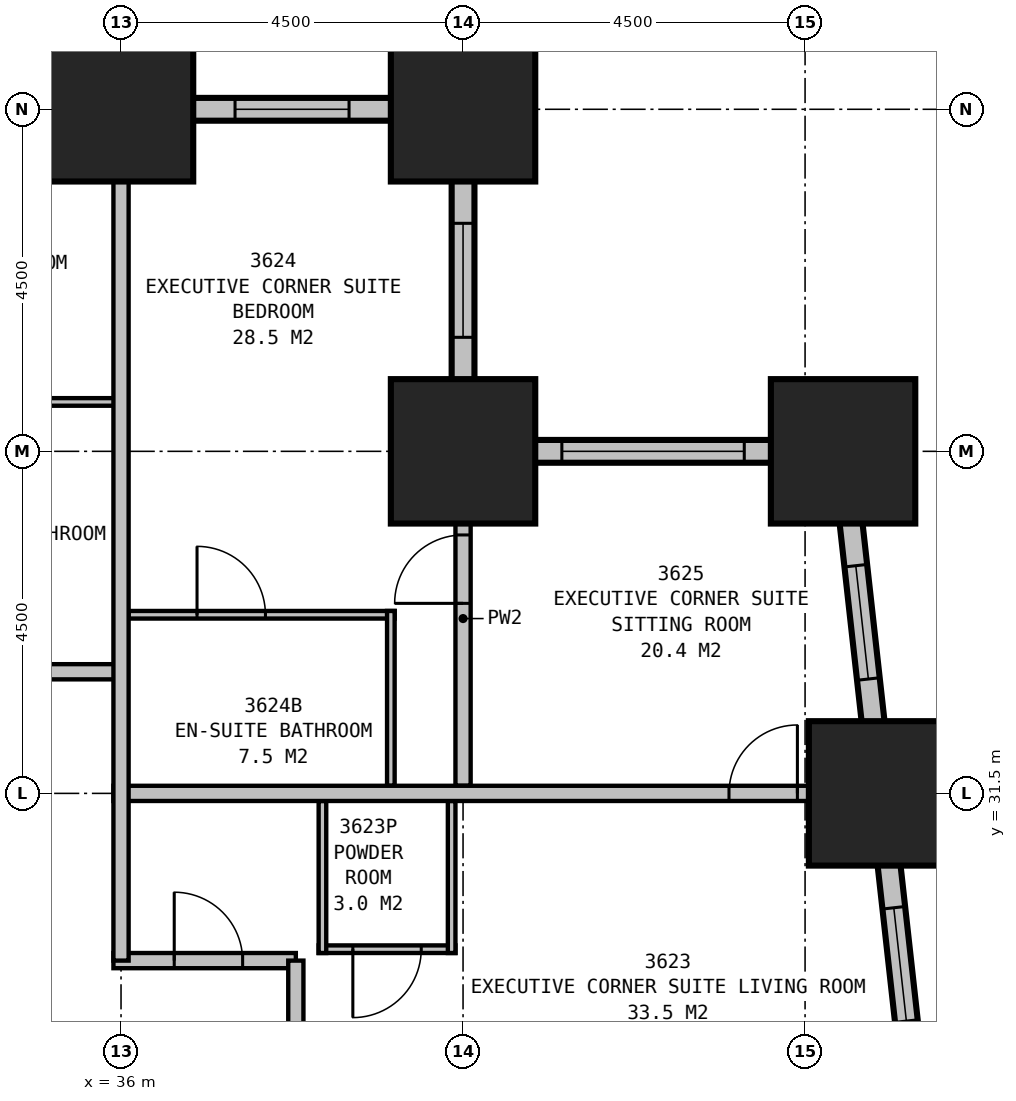
"""IFC4 building model, lengths in metres.
Left out: names, types, materials, properties, quantities, classifications, styles, units other than length and angle.
Written with IfcOpenShell. Run it as: python <this file> out.ifc"""

import sys

from ifc_helpers import new_model, si_unit, direction, frame, frame_2d, origin, origin_2d, place, context, subcontext, project, spatial, rectangle, extrude, element, fill, save


model = new_model("IFC4")
c1 = context("Model", 3, precision=1e-05, world=origin(), true_north=direction((0.0, 1.0)))
c2 = subcontext(c1, "Body", "Model", "MODEL_VIEW")
j1 = project(units=[si_unit("LENGTHUNIT", "METRE"), si_unit("PLANEANGLEUNIT", "RADIAN")], contexts=[c1])
p1 = place(None, origin())
s1 = spatial("IfcSite", under=j1, at=p1, CompositionType="ELEMENT")
p2 = place(p1, origin())
s2 = spatial("IfcBuilding", under=s1, at=p2, CompositionType="ELEMENT")
p3 = place(p2, frame((0.0, 0.0, 138.9)))
s3 = spatial("IfcBuildingStorey", under=s2, at=p3, CompositionType="ELEMENT", Elevation=138.9)
for number, where, z_axis, x_axis in (
    (1, (46.0, 31.5, 0.0), (0.0, 0.0, 1.0), (1.0, 0.0, 0.0)),
    (2, (45.5, 36.0, 0.0), (0.0, 0.0, 1.0), (1.0, 0.0, 0.0)),
    (3, (40.5, 36.0, 0.0), (0.0, 0.0, 1.0), (1.0, 0.0, 0.0)),
    (4, (40.5, 40.5, 0.0), (0.0, 0.0, 1.0), (1.0, 0.0, 0.0)),
    (5, (36.0, 40.5, 0.0), (0.0, 0.0, 1.0), (1.0, 0.0, 0.0)),
):
    element("IfcColumn", number, at=place(p3, frame(where, z_axis=z_axis, x_axis=x_axis)), inside=s3, PredefinedType="COLUMN", context=c2, shape_type="SweptSolid", body=[
        extrude(rectangle(XDim=1.9, YDim=1.9, at=origin_2d()), origin(), (0.0, 0.0, 1.0), 3.5),
    ])
p4 = place(p3, frame((49.017, 4.351, 0.0), z_axis=(0.0, 0.0, 1.0), x_axis=(-0.110433201132, 0.993883548555, 0.0)))
e6 = element("IfcWall", 6, at=p4, inside=s3, PredefinedType="STANDARD", context=c2, shape_type="SweptSolid", body=[
    extrude(rectangle(XDim=31.994, YDim=0.3, at=frame_2d((15.997, 0.0))), origin(), (0.0, 0.0, 1.0), 2.15),
])
p5 = place(p4, frame((1.664, 0.0, 0.5)))
e7 = element("IfcOpeningElement", 7, at=p5, cuts=e6, PredefinedType="OPENING", context=c2, shape_type="SweptSolid", body=[
    extrude(rectangle(XDim=1.5, YDim=1.5, at=frame_2d((0.75, 0.75))), frame((0.0, 0.16, 0.0), z_axis=(0.0, -1.0, 0.0), x_axis=(1.0, 0.0, 0.0)), (0.0, 0.0, 1.0), 0.32),
])
p6 = place(p4, frame((6.192, 0.0, 0.5)))
e8 = element("IfcOpeningElement", 8, at=p6, cuts=e6, PredefinedType="OPENING", context=c2, shape_type="SweptSolid", body=[
    extrude(rectangle(XDim=1.5, YDim=1.5, at=frame_2d((0.75, 0.75))), frame((0.0, 0.16, 0.0), z_axis=(0.0, -1.0, 0.0), x_axis=(1.0, 0.0, 0.0)), (0.0, 0.0, 1.0), 0.32),
])
p7 = place(p4, frame((10.719, 0.0, 0.5)))
e9 = element("IfcOpeningElement", 9, at=p7, cuts=e6, PredefinedType="OPENING", context=c2, shape_type="SweptSolid", body=[
    extrude(rectangle(XDim=1.5, YDim=1.5, at=frame_2d((0.75, 0.75))), frame((0.0, 0.16, 0.0), z_axis=(0.0, -1.0, 0.0), x_axis=(1.0, 0.0, 0.0)), (0.0, 0.0, 1.0), 0.32),
])
p8 = place(p4, frame((15.247, 0.0, 0.5)))
e10 = element("IfcOpeningElement", 10, at=p8, cuts=e6, PredefinedType="OPENING", context=c2, shape_type="SweptSolid", body=[
    extrude(rectangle(XDim=1.5, YDim=1.5, at=frame_2d((0.75, 0.75))), frame((0.0, 0.16, 0.0), z_axis=(0.0, -1.0, 0.0), x_axis=(1.0, 0.0, 0.0)), (0.0, 0.0, 1.0), 0.32),
])
p9 = place(p4, frame((19.775, 0.0, 0.5)))
e11 = element("IfcOpeningElement", 11, at=p9, cuts=e6, PredefinedType="OPENING", context=c2, shape_type="SweptSolid", body=[
    extrude(rectangle(XDim=1.5, YDim=1.5, at=frame_2d((0.75, 0.75))), frame((0.0, 0.16, 0.0), z_axis=(0.0, -1.0, 0.0), x_axis=(1.0, 0.0, 0.0)), (0.0, 0.0, 1.0), 0.32),
])
p10 = place(p4, frame((24.302, 0.0, 0.5)))
e12 = element("IfcOpeningElement", 12, at=p10, cuts=e6, PredefinedType="OPENING", context=c2, shape_type="SweptSolid", body=[
    extrude(rectangle(XDim=1.5, YDim=1.5, at=frame_2d((0.75, 0.75))), frame((0.0, 0.16, 0.0), z_axis=(0.0, -1.0, 0.0), x_axis=(1.0, 0.0, 0.0)), (0.0, 0.0, 1.0), 0.32),
])
p11 = place(p4, frame((28.83, 0.0, 0.5)))
e13 = element("IfcOpeningElement", 13, at=p11, cuts=e6, PredefinedType="OPENING", context=c2, shape_type="SweptSolid", body=[
    extrude(rectangle(XDim=1.5, YDim=1.5, at=frame_2d((0.75, 0.75))), frame((0.0, 0.16, 0.0), z_axis=(0.0, -1.0, 0.0), x_axis=(1.0, 0.0, 0.0)), (0.0, 0.0, 1.0), 0.32),
])
p12 = place(p3, frame((45.65, 36.0, 0.0), z_axis=(0.0, 0.0, 1.0), x_axis=(-1.0, 0.0, 0.0)))
e14 = element("IfcWall", 14, at=p12, inside=s3, PredefinedType="STANDARD", context=c2, shape_type="SweptSolid", body=[
    extrude(rectangle(XDim=5.3, YDim=0.3, at=frame_2d((2.65, 0.0))), origin(), (0.0, 0.0, 1.0), 2.15),
])
p13 = place(p12, frame((1.45, 0.0, 0.5)))
e15 = element("IfcOpeningElement", 15, at=p13, cuts=e14, PredefinedType="OPENING", context=c2, shape_type="SweptSolid", body=[
    extrude(rectangle(XDim=2.4, YDim=1.5, at=frame_2d((1.2, 0.75))), frame((0.0, 0.16, 0.0), z_axis=(0.0, -1.0, 0.0), x_axis=(1.0, 0.0, 0.0)), (0.0, 0.0, 1.0), 0.32),
])
p14 = place(p3, frame((40.5, 35.85, 0.0), z_axis=(0.0, 0.0, 1.0), x_axis=(0.0, 1.0, 0.0)))
e16 = element("IfcWall", 16, at=p14, inside=s3, PredefinedType="STANDARD", context=c2, shape_type="SweptSolid", body=[
    extrude(rectangle(XDim=4.8, YDim=0.3, at=frame_2d((2.4, 0.0))), origin(), (0.0, 0.0, 1.0), 2.15),
])
p15 = place(p14, frame((1.65, 0.0, 0.5)))
e17 = element("IfcOpeningElement", 17, at=p15, cuts=e16, PredefinedType="OPENING", context=c2, shape_type="SweptSolid", body=[
    extrude(rectangle(XDim=1.5, YDim=1.5, at=frame_2d((0.75, 0.75))), frame((0.0, 0.16, 0.0), z_axis=(0.0, -1.0, 0.0), x_axis=(1.0, 0.0, 0.0)), (0.0, 0.0, 1.0), 0.32),
])
p16 = place(p3, frame((40.65, 40.5, 0.0), z_axis=(0.0, 0.0, 1.0), x_axis=(-1.0, 0.0, 0.0)))
e18 = element("IfcWall", 18, at=p16, inside=s3, PredefinedType="STANDARD", context=c2, shape_type="SweptSolid", body=[
    extrude(rectangle(XDim=31.8, YDim=0.3, at=frame_2d((15.9, 0.0))), origin(), (0.0, 0.0, 1.0), 2.15),
])
p17 = place(p16, frame((1.65, 0.0, 0.5)))
e19 = element("IfcOpeningElement", 19, at=p17, cuts=e18, PredefinedType="OPENING", context=c2, shape_type="SweptSolid", body=[
    extrude(rectangle(XDim=1.5, YDim=1.5, at=frame_2d((0.75, 0.75))), frame((0.0, 0.16, 0.0), z_axis=(0.0, -1.0, 0.0), x_axis=(1.0, 0.0, 0.0)), (0.0, 0.0, 1.0), 0.32),
])
p18 = place(p16, frame((6.15, 0.0, 0.5)))
e20 = element("IfcOpeningElement", 20, at=p18, cuts=e18, PredefinedType="OPENING", context=c2, shape_type="SweptSolid", body=[
    extrude(rectangle(XDim=1.5, YDim=1.5, at=frame_2d((0.75, 0.75))), frame((0.0, 0.16, 0.0), z_axis=(0.0, -1.0, 0.0), x_axis=(1.0, 0.0, 0.0)), (0.0, 0.0, 1.0), 0.32),
])
p19 = place(p16, frame((10.65, 0.0, 0.5)))
e21 = element("IfcOpeningElement", 21, at=p19, cuts=e18, PredefinedType="OPENING", context=c2, shape_type="SweptSolid", body=[
    extrude(rectangle(XDim=1.5, YDim=1.5, at=frame_2d((0.75, 0.75))), frame((0.0, 0.16, 0.0), z_axis=(0.0, -1.0, 0.0), x_axis=(1.0, 0.0, 0.0)), (0.0, 0.0, 1.0), 0.32),
])
p20 = place(p16, frame((15.15, 0.0, 0.5)))
e22 = element("IfcOpeningElement", 22, at=p20, cuts=e18, PredefinedType="OPENING", context=c2, shape_type="SweptSolid", body=[
    extrude(rectangle(XDim=1.5, YDim=1.5, at=frame_2d((0.75, 0.75))), frame((0.0, 0.16, 0.0), z_axis=(0.0, -1.0, 0.0), x_axis=(1.0, 0.0, 0.0)), (0.0, 0.0, 1.0), 0.32),
])
p21 = place(p16, frame((19.65, 0.0, 0.5)))
e23 = element("IfcOpeningElement", 23, at=p21, cuts=e18, PredefinedType="OPENING", context=c2, shape_type="SweptSolid", body=[
    extrude(rectangle(XDim=1.5, YDim=1.5, at=frame_2d((0.75, 0.75))), frame((0.0, 0.16, 0.0), z_axis=(0.0, -1.0, 0.0), x_axis=(1.0, 0.0, 0.0)), (0.0, 0.0, 1.0), 0.32),
])
p22 = place(p16, frame((24.15, 0.0, 0.5)))
e24 = element("IfcOpeningElement", 24, at=p22, cuts=e18, PredefinedType="OPENING", context=c2, shape_type="SweptSolid", body=[
    extrude(rectangle(XDim=1.5, YDim=1.5, at=frame_2d((0.75, 0.75))), frame((0.0, 0.16, 0.0), z_axis=(0.0, -1.0, 0.0), x_axis=(1.0, 0.0, 0.0)), (0.0, 0.0, 1.0), 0.32),
])
p23 = place(p16, frame((28.65, 0.0, 0.5)))
e25 = element("IfcOpeningElement", 25, at=p23, cuts=e18, PredefinedType="OPENING", context=c2, shape_type="SweptSolid", body=[
    extrude(rectangle(XDim=1.5, YDim=1.5, at=frame_2d((0.75, 0.75))), frame((0.0, 0.16, 0.0), z_axis=(0.0, -1.0, 0.0), x_axis=(1.0, 0.0, 0.0)), (0.0, 0.0, 1.0), 0.32),
])
p24 = place(p3, frame((13.5, 33.1, 0.0), z_axis=(0.0, 0.0, 1.0), x_axis=(1.0, 0.0, 0.0)))
e26 = element("IfcWall", 26, at=p24, inside=s3, PredefinedType="PARTITIONING", context=c2, shape_type="SweptSolid", body=[
    extrude(rectangle(XDim=22.5, YDim=0.2, at=frame_2d((11.25, 0.0))), origin(), (0.0, 0.0, 1.0), 3.25),
])
p25 = place(p24, frame((0.85, 0.0, 0.0)))
e27 = element("IfcOpeningElement", 27, at=p25, cuts=e26, PredefinedType="OPENING", context=c2, shape_type="SweptSolid", body=[
    extrude(rectangle(XDim=0.9, YDim=2.1, at=frame_2d((0.45, 1.05))), frame((0.0, 0.11, 0.0), z_axis=(0.0, -1.0, 0.0), x_axis=(1.0, 0.0, 0.0)), (0.0, 0.0, 1.0), 0.22),
])
p26 = place(p24, frame((10.7, 0.0, 0.0)))
e28 = element("IfcOpeningElement", 28, at=p26, cuts=e26, PredefinedType="OPENING", context=c2, shape_type="SweptSolid", body=[
    extrude(rectangle(XDim=1.0, YDim=2.1, at=frame_2d((0.5, 1.05))), frame((0.0, 0.11, 0.0), z_axis=(0.0, -1.0, 0.0), x_axis=(1.0, 0.0, 0.0)), (0.0, 0.0, 1.0), 0.22),
])
p27 = place(p24, frame((15.15, 0.0, 0.0)))
e29 = element("IfcOpeningElement", 29, at=p27, cuts=e26, PredefinedType="OPENING", context=c2, shape_type="SweptSolid", body=[
    extrude(rectangle(XDim=0.9, YDim=2.1, at=frame_2d((0.45, 1.05))), frame((0.0, 0.11, 0.0), z_axis=(0.0, -1.0, 0.0), x_axis=(1.0, 0.0, 0.0)), (0.0, 0.0, 1.0), 0.22),
])
p28 = place(p3, frame((35.9, 29.3, 0.0), z_axis=(0.0, 0.0, 1.0), x_axis=(1.0, 0.0, 0.0)))
e30 = element("IfcWall", 30, at=p28, inside=s3, PredefinedType="PARTITIONING", context=c2, shape_type="SweptSolid", body=[
    extrude(rectangle(XDim=2.4, YDim=0.2, at=frame_2d((1.2, 0.0))), origin(), (0.0, 0.0, 1.0), 3.25),
])
p29 = place(p28, frame((0.8, 0.0, 0.0)))
e31 = element("IfcOpeningElement", 31, at=p29, cuts=e30, PredefinedType="OPENING", context=c2, shape_type="SweptSolid", body=[
    extrude(rectangle(XDim=0.9, YDim=2.1, at=frame_2d((0.45, 1.05))), frame((0.0, 0.11, 0.0), z_axis=(0.0, -1.0, 0.0), x_axis=(1.0, 0.0, 0.0)), (0.0, 0.0, 1.0), 0.22),
])
p30 = place(p3, frame((38.3, 11.2, 0.0), z_axis=(0.0, 0.0, 1.0), x_axis=(0.0, 1.0, 0.0)))
e32 = element("IfcWall", 32, at=p30, inside=s3, PredefinedType="PARTITIONING", context=c2, shape_type="SweptSolid", body=[
    extrude(rectangle(XDim=18.1, YDim=0.2, at=frame_2d((9.05, 0.0))), origin(), (0.0, 0.0, 1.0), 3.25),
])
p31 = place(p30, frame((5.0, 0.0, 0.0), z_axis=(0.0, 0.0, 1.0), x_axis=(-1.0, 0.0, 0.0)))
e33 = element("IfcOpeningElement", 33, at=p31, cuts=e32, PredefinedType="OPENING", context=c2, shape_type="SweptSolid", body=[
    extrude(rectangle(XDim=1.0, YDim=2.1, at=frame_2d((0.5, 1.05))), frame((0.0, 0.11, 0.0), z_axis=(0.0, -1.0, 0.0), x_axis=(1.0, 0.0, 0.0)), (0.0, 0.0, 1.0), 0.22),
])
p32 = place(p30, frame((8.55, 0.0, 0.0), z_axis=(0.0, 0.0, 1.0), x_axis=(-1.0, 0.0, 0.0)))
e34 = element("IfcOpeningElement", 34, at=p32, cuts=e32, PredefinedType="OPENING", context=c2, shape_type="SweptSolid", body=[
    extrude(rectangle(XDim=0.9, YDim=2.1, at=frame_2d((0.45, 1.05))), frame((0.0, 0.11, 0.0), z_axis=(0.0, -1.0, 0.0), x_axis=(1.0, 0.0, 0.0)), (0.0, 0.0, 1.0), 0.22),
])
p33 = place(p3, frame((33.0, 36.65, 0.0), z_axis=(0.0, 0.0, 1.0), x_axis=(1.0, 0.0, 0.0)))
e35 = element("IfcWall", 35, at=p33, inside=s3, PredefinedType="PLUMBINGWALL", context=c2, shape_type="SweptSolid", body=[
    extrude(rectangle(XDim=3.0, YDim=0.1, at=frame_2d((1.5, 0.0))), origin(), (0.0, 0.0, 1.0), 3.25),
])
p34 = place(p3, frame((36.0, 29.3, 0.0), z_axis=(0.0, 0.0, 1.0), x_axis=(0.0, 1.0, 0.0)))
e36 = element("IfcWall", 36, at=p34, inside=s3, PredefinedType="PARTITIONING", context=c2, shape_type="SweptSolid", body=[
    extrude(rectangle(XDim=11.2, YDim=0.2, at=frame_2d((5.6, 0.0))), origin(), (0.0, 0.0, 1.0), 2.25),
])
p35 = place(p3, frame((35.9, 31.5, 0.0), z_axis=(0.0, 0.0, 1.0), x_axis=(1.0, 0.0, 0.0)))
e37 = element("IfcWall", 37, at=p35, inside=s3, PredefinedType="PARTITIONING", context=c2, shape_type="SweptSolid", body=[
    extrude(rectangle(XDim=10.099, YDim=0.2, at=frame_2d((5.05, 0.0))), origin(), (0.0, 0.0, 1.0), 3.25),
])
p36 = place(p35, frame((8.099, 0.0, 0.0)))
e38 = element("IfcOpeningElement", 38, at=p36, cuts=e37, PredefinedType="OPENING", context=c2, shape_type="SweptSolid", body=[
    extrude(rectangle(XDim=0.9, YDim=2.1, at=frame_2d((0.45, 1.05))), frame((0.0, 0.11, 0.0), z_axis=(0.0, -1.0, 0.0), x_axis=(1.0, 0.0, 0.0)), (0.0, 0.0, 1.0), 0.22),
])
p37 = place(p3, frame((40.35, 31.4, 0.0), z_axis=(0.0, 0.0, 1.0), x_axis=(0.0, -1.0, 0.0)))
e39 = element("IfcWall", 39, at=p37, inside=s3, PredefinedType="PLUMBINGWALL", context=c2, shape_type="SweptSolid", body=[
    extrude(rectangle(XDim=2.0, YDim=0.1, at=frame_2d((1.0, 0.0))), origin(), (0.0, 0.0, 1.0), 2.25),
])
p38 = place(p3, frame((38.65, 31.4, 0.0), z_axis=(0.0, 0.0, 1.0), x_axis=(0.0, -1.0, 0.0)))
e40 = element("IfcWall", 40, at=p38, inside=s3, PredefinedType="PLUMBINGWALL", context=c2, shape_type="SweptSolid", body=[
    extrude(rectangle(XDim=2.0, YDim=0.1, at=frame_2d((1.0, 0.0))), origin(), (0.0, 0.0, 1.0), 3.25),
])
p39 = place(p3, frame((38.6, 29.45, 0.0), z_axis=(0.0, 0.0, 1.0), x_axis=(1.0, 0.0, 0.0)))
e41 = element("IfcWall", 41, at=p39, inside=s3, PredefinedType="PLUMBINGWALL", context=c2, shape_type="SweptSolid", body=[
    extrude(rectangle(XDim=1.8, YDim=0.1, at=frame_2d((0.9, 0.0))), origin(), (0.0, 0.0, 1.0), 3.25),
])
p40 = place(p39, frame((1.35, 0.0, 0.0), z_axis=(0.0, 0.0, 1.0), x_axis=(-1.0, 0.0, 0.0)))
e42 = element("IfcOpeningElement", 42, at=p40, cuts=e41, PredefinedType="OPENING", context=c2, shape_type="SweptSolid", body=[
    extrude(rectangle(XDim=0.9, YDim=2.1, at=frame_2d((0.45, 1.05))), frame((0.0, 0.06, 0.0), z_axis=(0.0, -1.0, 0.0), x_axis=(1.0, 0.0, 0.0)), (0.0, 0.0, 1.0), 0.12),
])
p41 = place(p3, frame((40.5, 31.6, 0.0), z_axis=(0.0, 0.0, 1.0), x_axis=(0.0, 1.0, 0.0)))
e43 = element("IfcWall", 43, at=p41, inside=s3, PredefinedType="PARTITIONING", context=c2, shape_type="SweptSolid", body=[
    extrude(rectangle(XDim=4.4, YDim=0.2, at=frame_2d((2.2, 0.0))), origin(), (0.0, 0.0, 1.0), 2.25),
])
p42 = place(p41, frame((2.4, 0.0, 0.0)))
e44 = element("IfcOpeningElement", 44, at=p42, cuts=e43, PredefinedType="OPENING", context=c2, shape_type="SweptSolid", body=[
    extrude(rectangle(XDim=0.9, YDim=2.1, at=frame_2d((0.45, 1.05))), frame((0.0, 0.11, 0.0), z_axis=(0.0, -1.0, 0.0), x_axis=(1.0, 0.0, 0.0)), (0.0, 0.0, 1.0), 0.22),
])
p43 = place(p3, frame((39.55, 31.6, 0.0), z_axis=(0.0, 0.0, 1.0), x_axis=(0.0, 1.0, 0.0)))
e45 = element("IfcWall", 45, at=p43, inside=s3, PredefinedType="PLUMBINGWALL", context=c2, shape_type="SweptSolid", body=[
    extrude(rectangle(XDim=2.3, YDim=0.1, at=frame_2d((1.15, 0.0))), origin(), (0.0, 0.0, 1.0), 3.25),
])
p44 = place(p3, frame((36.1, 33.85, 0.0), z_axis=(0.0, 0.0, 1.0), x_axis=(1.0, 0.0, 0.0)))
e46 = element("IfcWall", 46, at=p44, inside=s3, PredefinedType="PLUMBINGWALL", context=c2, shape_type="SweptSolid", body=[
    extrude(rectangle(XDim=3.5, YDim=0.1, at=frame_2d((1.75, 0.0))), origin(), (0.0, 0.0, 1.0), 3.25),
])
p45 = place(p44, frame((0.9, 0.0, 0.0)))
e47 = element("IfcOpeningElement", 47, at=p45, cuts=e46, PredefinedType="OPENING", context=c2, shape_type="SweptSolid", body=[
    extrude(rectangle(XDim=0.9, YDim=2.1, at=frame_2d((0.45, 1.05))), frame((0.0, 0.06, 0.0), z_axis=(0.0, -1.0, 0.0), x_axis=(1.0, 0.0, 0.0)), (0.0, 0.0, 1.0), 0.12),
])
p46 = place(p10, origin())
e48 = element("IfcWindow", 48, at=p46, inside=s3, PartitioningType="SINGLE_PANEL", PredefinedType="WINDOW", context=c2, shape_type="SweptSolid", body=[
    extrude(rectangle(XDim=1.5, YDim=1.5, at=frame_2d((0.75, 0.75))), frame((0.0, 0.03, 0.0), z_axis=(0.0, -1.0, 0.0), x_axis=(1.0, 0.0, 0.0)), (0.0, 0.0, 1.0), 0.06),
])
fill(e12, e48)
p47 = place(p11, origin())
e49 = element("IfcWindow", 49, at=p47, inside=s3, PartitioningType="SINGLE_PANEL", PredefinedType="WINDOW", context=c2, shape_type="SweptSolid", body=[
    extrude(rectangle(XDim=1.5, YDim=1.5, at=frame_2d((0.75, 0.75))), frame((0.0, 0.03, 0.0), z_axis=(0.0, -1.0, 0.0), x_axis=(1.0, 0.0, 0.0)), (0.0, 0.0, 1.0), 0.06),
])
fill(e13, e49)
p48 = place(p13, origin())
e50 = element("IfcWindow", 50, at=p48, inside=s3, PartitioningType="SINGLE_PANEL", PredefinedType="WINDOW", context=c2, shape_type="SweptSolid", body=[
    extrude(rectangle(XDim=2.4, YDim=1.5, at=frame_2d((1.2, 0.75))), frame((0.0, 0.03, 0.0), z_axis=(0.0, -1.0, 0.0), x_axis=(1.0, 0.0, 0.0)), (0.0, 0.0, 1.0), 0.06),
])
fill(e15, e50)
p49 = place(p15, origin())
e51 = element("IfcWindow", 51, at=p49, inside=s3, PartitioningType="SINGLE_PANEL", PredefinedType="WINDOW", context=c2, shape_type="SweptSolid", body=[
    extrude(rectangle(XDim=1.5, YDim=1.5, at=frame_2d((0.75, 0.75))), frame((0.0, 0.03, 0.0), z_axis=(0.0, -1.0, 0.0), x_axis=(1.0, 0.0, 0.0)), (0.0, 0.0, 1.0), 0.06),
])
fill(e17, e51)
p50 = place(p17, origin())
e52 = element("IfcWindow", 52, at=p50, inside=s3, PartitioningType="SINGLE_PANEL", PredefinedType="WINDOW", context=c2, shape_type="SweptSolid", body=[
    extrude(rectangle(XDim=1.5, YDim=1.5, at=frame_2d((0.75, 0.75))), frame((0.0, 0.03, 0.0), z_axis=(0.0, -1.0, 0.0), x_axis=(1.0, 0.0, 0.0)), (0.0, 0.0, 1.0), 0.06),
])
fill(e19, e52)
p51 = place(p29, origin())
e53 = element("IfcDoor", 53, at=p51, inside=s3, OperationType="SINGLE_SWING_LEFT", PredefinedType="DOOR", context=c2, shape_type="SweptSolid", body=[
    extrude(rectangle(XDim=0.9, YDim=2.1, at=frame_2d((0.45, 1.05))), frame((0.0, 0.025, 0.0), z_axis=(0.0, -1.0, 0.0), x_axis=(1.0, 0.0, 0.0)), (0.0, 0.0, 1.0), 0.05),
])
fill(e31, e53)
p52 = place(p36, origin())
e54 = element("IfcDoor", 54, at=p52, inside=s3, OperationType="SINGLE_SWING_RIGHT", PredefinedType="DOOR", context=c2, shape_type="SweptSolid", body=[
    extrude(rectangle(XDim=0.9, YDim=2.1, at=frame_2d((0.45, 1.05))), frame((0.0, 0.025, 0.0), z_axis=(0.0, -1.0, 0.0), x_axis=(1.0, 0.0, 0.0)), (0.0, 0.0, 1.0), 0.05),
])
fill(e38, e54)
p53 = place(p40, origin())
e55 = element("IfcDoor", 55, at=p53, inside=s3, OperationType="SINGLE_SWING_RIGHT", PredefinedType="DOOR", context=c2, shape_type="SweptSolid", body=[
    extrude(rectangle(XDim=0.9, YDim=2.1, at=frame_2d((0.45, 1.05))), frame((0.0, 0.025, 0.0), z_axis=(0.0, -1.0, 0.0), x_axis=(1.0, 0.0, 0.0)), (0.0, 0.0, 1.0), 0.05),
])
fill(e42, e55)
p54 = place(p42, origin())
e56 = element("IfcDoor", 56, at=p54, inside=s3, OperationType="SINGLE_SWING_LEFT", PredefinedType="DOOR", context=c2, shape_type="SweptSolid", body=[
    extrude(rectangle(XDim=0.9, YDim=2.1, at=frame_2d((0.45, 1.05))), frame((0.0, 0.025, 0.0), z_axis=(0.0, -1.0, 0.0), x_axis=(1.0, 0.0, 0.0)), (0.0, 0.0, 1.0), 0.05),
])
fill(e44, e56)
p55 = place(p45, origin())
e57 = element("IfcDoor", 57, at=p55, inside=s3, OperationType="SINGLE_SWING_LEFT", PredefinedType="DOOR", context=c2, shape_type="SweptSolid", body=[
    extrude(rectangle(XDim=0.9, YDim=2.1, at=frame_2d((0.45, 1.05))), frame((0.0, 0.025, 0.0), z_axis=(0.0, -1.0, 0.0), x_axis=(1.0, 0.0, 0.0)), (0.0, 0.0, 1.0), 0.05),
])
fill(e47, e57)
save(model, sys.argv[1])
